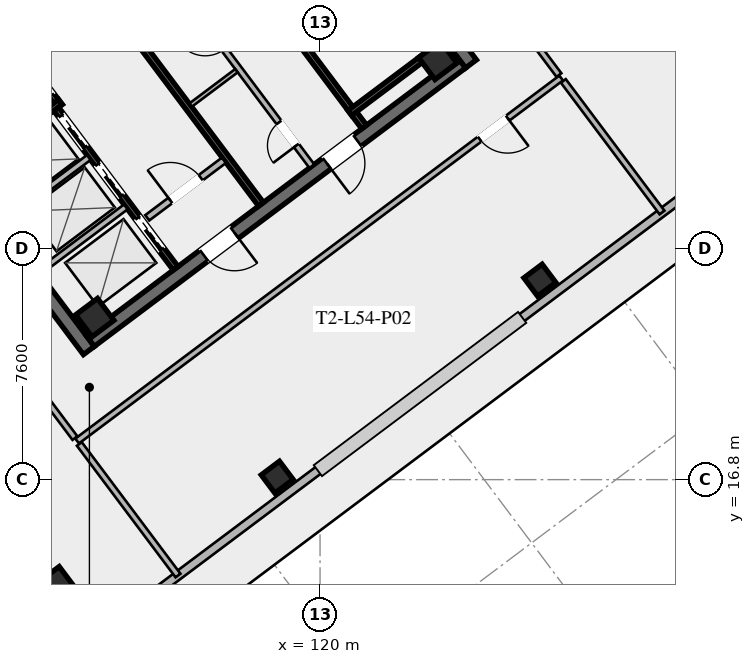
"""IFC4 building model, lengths in metres.
Left out: names, types, materials, properties, quantities, classifications, styles, units other than length and angle.
Written with IfcOpenShell. Run it as: python <this file> out.ifc"""

import sys

from ifc_helpers import new_model, si_unit, direction, frame, frame_2d, origin, origin_2d, place, context, subcontext, project, spatial, rectangle, hollow_rectangle, extrude, element, fill, save


model = new_model("IFC4")
c1 = context("Model", 3, precision=1e-05, world=origin(), true_north=direction((0.0, 1.0)))
c2 = subcontext(c1, "Body", "Model", "MODEL_VIEW")
j1 = project(units=[si_unit("LENGTHUNIT", "METRE"), si_unit("PLANEANGLEUNIT", "RADIAN")], contexts=[c1])
p1 = place(None, origin())
s1 = spatial("IfcSite", under=j1, at=p1, CompositionType="ELEMENT")
p2 = place(p1, origin())
s2 = spatial("IfcBuilding", under=s1, at=p2, CompositionType="ELEMENT")
p3 = place(p2, frame((0.0, 0.0, 199.6)))
s3 = spatial("IfcBuildingStorey", under=s2, at=p3, CompositionType="ELEMENT", Elevation=199.6)
for number, where, z_axis, x_axis in (
    (1, (112.396, 21.047, 0.0), (0.0, 0.0, 1.0), (-0.6, 0.8, 0.0)),
    (2, (115.604, 42.953, 0.0), (0.0, 0.0, 1.0), (0.6, -0.8, 0.0)),
):
    element("IfcWall", number, at=place(p3, frame(where, z_axis=z_axis, x_axis=x_axis)), inside=s3, PredefinedType="SHEAR", context=c2, shape_type="SweptSolid", body=[
        extrude(rectangle(XDim=15.6, YDim=0.45, at=frame_2d((7.8, 0.0))), origin(), (0.0, 0.0, 1.0), 4.6),
    ])
p4 = place(p3, frame((124.649, 30.518, 0.0), z_axis=(0.0, 0.0, 1.0), x_axis=(-0.8, -0.6, 0.0)))
e3 = element("IfcWall", 3, at=p4, inside=s3, PredefinedType="SHEAR", context=c2, shape_type="SweptSolid", body=[
    extrude(rectangle(XDim=15.26, YDim=0.45, at=frame_2d((7.63, 0.0))), origin(), (0.0, 0.0, 1.0), 4.6),
])
p5 = place(p4, frame((9.33, 0.0, 0.0)))
e4 = element("IfcOpeningElement", 4, at=p5, cuts=e3, PredefinedType="OPENING", context=c2, shape_type="SweptSolid", body=[
    extrude(rectangle(XDim=1.25, YDim=2.25, at=frame_2d((0.625, 1.125))), frame((0.0, 0.235, 0.0), z_axis=(0.0, -1.0, 0.0), x_axis=(1.0, 0.0, 0.0)), (0.0, 0.0, 1.0), 0.47),
])
p6 = place(p4, frame((4.28, 0.0, 0.0)))
e5 = element("IfcOpeningElement", 5, at=p6, cuts=e3, PredefinedType="OPENING", context=c2, shape_type="SweptSolid", body=[
    extrude(rectangle(XDim=1.25, YDim=2.25, at=frame_2d((0.625, 1.125))), frame((0.0, 0.235, 0.0), z_axis=(0.0, -1.0, 0.0), x_axis=(1.0, 0.0, 0.0)), (0.0, 0.0, 1.0), 0.47),
])
for number, where, z_axis, x_axis in (
    (6, (112.59, 22.13, 0.0), (0.0, 0.0, 1.0), (0.8, 0.6, 0.0)),
    (7, (123.87, 30.59, 0.0), (0.0, 0.0, 1.0), (0.8, 0.6, 0.0)),
):
    element("IfcColumn", number, at=place(p3, frame(where, z_axis=z_axis, x_axis=x_axis)), inside=s3, PredefinedType="COLUMN", context=c2, shape_type="SweptSolid", body=[
        extrude(hollow_rectangle(XDim=0.9, YDim=0.9, WallThickness=0.04, at=origin_2d()), origin(), (0.0, 0.0, 1.0), 4.42),
    ])
p7 = place(p3, frame((111.32, 13.24, -0.295), z_axis=(0.0, 0.0, 1.0), x_axis=(0.799999996291, 0.600000004945, 0.0)))
e8 = element("IfcColumn", 8, at=p7, inside=s3, PredefinedType="COLUMN", context=c2, shape_type="SweptSolid", body=[
    extrude(hollow_rectangle(XDim=1.0, YDim=1.0, WallThickness=0.04, at=origin_2d()), origin(), (0.0, 0.0, 1.0), 4.715),
])
for number, where, z_axis, x_axis in (
    (9, (118.59, 16.88, -0.295), (0.0, 0.0, 1.0), (0.8, 0.6, 0.0)),
    (10, (127.23, 23.36, -0.295), (0.0, 0.0, 1.0), (0.8, 0.6, 0.0)),
):
    element("IfcColumn", number, at=place(p3, frame(where, z_axis=z_axis, x_axis=x_axis)), inside=s3, PredefinedType="COLUMN", context=c2, shape_type="SweptSolid", body=[
        extrude(hollow_rectangle(XDim=0.75, YDim=0.75, WallThickness=0.032, at=origin_2d()), origin(), (0.0, 0.0, 1.0), 4.715),
    ])
for number, where, z_axis, x_axis in (
    (11, (134.072, 27.704, 0.0), (0.0, 0.0, 1.0), (-0.8, -0.6, 0.0)),
    (12, (118.296, 52.072, 0.0), (0.0, 0.0, 1.0), (0.6, -0.8, 0.0)),
):
    element("IfcWall", number, at=place(p3, frame(where, z_axis=z_axis, x_axis=x_axis)), inside=s3, PredefinedType="SOLIDWALL", context=c2, shape_type="SweptSolid", body=[
        extrude(rectangle(XDim=26.96, YDim=0.28, at=frame_2d((13.48, 0.0))), origin(), (0.0, 0.0, 1.0), 4.42),
    ])
p8 = place(p3, frame((111.44, 29.08, 0.0), z_axis=(0.0, 0.0, 1.0), x_axis=(-0.59999041401, 0.800007189403, 0.0)))
e13 = element("IfcWall", 13, at=p8, inside=s3, PredefinedType="SHEAR", context=c2, shape_type="SweptSolid", body=[
    extrude(rectangle(XDim=8.15, YDim=0.2, at=frame_2d((4.075, 0.0))), origin(), (0.0, 0.0, 1.0), 4.42),
])
p9 = place(p8, frame((0.45, 0.0, 0.0)))
e14 = element("IfcOpeningElement", 14, at=p9, cuts=e13, PredefinedType="OPENING", context=c2, shape_type="SweptSolid", body=[
    extrude(rectangle(XDim=1.15, YDim=2.2, at=frame_2d((0.575, 1.1))), frame((0.0, 0.11, 0.0), z_axis=(0.0, -1.0, 0.0), x_axis=(1.0, 0.0, 0.0)), (0.0, 0.0, 1.0), 0.22),
])
p10 = place(p3, frame((108.316, 26.862, 0.0), z_axis=(0.0, 0.0, 1.0), x_axis=(0.800014909178, 0.599980120581, 0.0)))
e15 = element("IfcWall", 15, at=p10, inside=s3, PredefinedType="SHEAR", context=c2, shape_type="SweptSolid", body=[
    extrude(rectangle(XDim=3.93, YDim=0.2, at=frame_2d((1.965, 0.0))), origin(), (0.0, 0.0, 1.0), 4.42),
])
p11 = place(p3, frame((116.56, 34.92, 0.0), z_axis=(0.0, 0.0, 1.0), x_axis=(0.59999041401, -0.800007189403, 0.0)))
e16 = element("IfcWall", 16, at=p11, inside=s3, PredefinedType="SHEAR", context=c2, shape_type="SweptSolid", body=[
    extrude(rectangle(XDim=8.15, YDim=0.2, at=frame_2d((4.075, 0.0))), origin(), (0.0, 0.0, 1.0), 4.42),
])
p12 = place(p11, frame((0.45, 0.0, 0.0)))
e17 = element("IfcOpeningElement", 17, at=p12, cuts=e16, PredefinedType="OPENING", context=c2, shape_type="SweptSolid", body=[
    extrude(rectangle(XDim=1.15, YDim=2.2, at=frame_2d((0.575, 1.1))), frame((0.0, 0.11, 0.0), z_axis=(0.0, -1.0, 0.0), x_axis=(1.0, 0.0, 0.0)), (0.0, 0.0, 1.0), 0.22),
])
p13 = place(p3, frame((120.98, 28.86, 0.0), z_axis=(0.0, 0.0, 1.0), x_axis=(0.800014909178, 0.599980120581, 0.0)))
e18 = element("IfcWall", 18, at=p13, inside=s3, PredefinedType="SHEAR", context=c2, shape_type="SweptSolid", body=[
    extrude(rectangle(XDim=3.93, YDim=0.2, at=frame_2d((1.965, 0.0))), origin(), (0.0, 0.0, 1.0), 4.42),
])
p14 = place(p3, frame((118.058, 25.856, 0.0), z_axis=(0.0, 0.0, 1.0), x_axis=(-0.600002657301, 0.799998007018, 0.0)))
e19 = element("IfcWall", 19, at=p14, inside=s3, PredefinedType="SHEAR", context=c2, shape_type="SweptSolid", body=[
    extrude(rectangle(XDim=14.7, YDim=0.2, at=frame_2d((7.35, 0.0))), origin(), (0.0, 0.0, 1.0), 4.42),
])
p15 = place(p3, frame((114.316, 25.412, 0.0), z_axis=(0.0, 0.0, 1.0), x_axis=(0.800018601094, 0.59997519774, 0.0)))
e20 = element("IfcWall", 20, at=p15, inside=s3, PredefinedType="SOLIDWALL", context=c2, shape_type="SweptSolid", body=[
    extrude(rectangle(XDim=3.15, YDim=0.22, at=frame_2d((1.575, 0.0))), origin(), (0.0, 0.0, 1.0), 3.531),
])
p16 = place(p15, frame((0.95, 0.0, 0.0)))
e21 = element("IfcOpeningElement", 21, at=p16, cuts=e20, PredefinedType="OPENING", context=c2, shape_type="SweptSolid", body=[
    extrude(rectangle(XDim=1.25, YDim=2.25, at=frame_2d((0.625, 1.125))), frame((0.0, 0.12, 0.0), z_axis=(0.0, -1.0, 0.0), x_axis=(1.0, 0.0, 0.0)), (0.0, 0.0, 1.0), 0.24),
])
p17 = place(p3, frame((115.25, 23.75, 0.0), z_axis=(0.0, 0.0, 1.0), x_axis=(-0.599994036198, 0.800004472816, 0.0)))
e22 = element("IfcWall", 22, at=p17, inside=s3, PredefinedType="SHEAR", context=c2, shape_type="SweptSolid", body=[
    extrude(rectangle(XDim=6.55, YDim=0.2, at=frame_2d((3.275, 0.0))), origin(), (0.0, 0.0, 1.0), 4.42),
])
p18 = place(p17, frame((4.975, 0.0, 0.0)))
e23 = element("IfcOpeningElement", 23, at=p18, cuts=e22, PredefinedType="OPENING", context=c2, shape_type="SweptSolid", body=[
    extrude(rectangle(XDim=1.3, YDim=2.25, at=frame_2d((0.65, 1.125))), frame((0.0, 0.11, 0.0), z_axis=(0.0, -1.0, 0.0), x_axis=(1.0, 0.0, 0.0)), (0.0, 0.0, 1.0), 0.22),
])
p19 = place(p17, frame((2.975, 0.0, 0.0)))
e24 = element("IfcOpeningElement", 24, at=p19, cuts=e22, PredefinedType="OPENING", context=c2, shape_type="SweptSolid", body=[
    extrude(rectangle(XDim=1.3, YDim=2.25, at=frame_2d((0.65, 1.125))), frame((0.0, 0.11, 0.0), z_axis=(0.0, -1.0, 0.0), x_axis=(1.0, 0.0, 0.0)), (0.0, 0.0, 1.0), 0.22),
])
p20 = place(p17, frame((0.775, 0.0, 0.0)))
e25 = element("IfcOpeningElement", 25, at=p20, cuts=e22, PredefinedType="OPENING", context=c2, shape_type="SweptSolid", body=[
    extrude(rectangle(XDim=1.3, YDim=2.25, at=frame_2d((0.65, 1.125))), frame((0.0, 0.11, 0.0), z_axis=(0.0, -1.0, 0.0), x_axis=(1.0, 0.0, 0.0)), (0.0, 0.0, 1.0), 0.22),
])
for number, where, z_axis, x_axis in (
    (26, (110.746, 23.622, 0.0), (0.0, 0.0, 1.0), (0.8, 0.6, 0.0)),
    (27, (109.528, 25.246, 0.0), (0.0, 0.0, 1.0), (0.8, 0.6, 0.0)),
):
    element("IfcWall", number, at=place(p3, frame(where, z_axis=z_axis, x_axis=x_axis)), inside=s3, PredefinedType="SOLIDWALL", context=c2, shape_type="SweptSolid", body=[
        extrude(rectangle(XDim=3.58, YDim=0.2, at=frame_2d((1.79, 0.0))), origin(), (0.0, 0.0, 1.0), 4.42),
    ])
p21 = place(p3, frame((119.73, 27.11, 0.0), z_axis=(0.0, 0.0, 1.0), x_axis=(-0.600005580459, 0.799995814625, 0.0)))
e28 = element("IfcWall", 28, at=p21, inside=s3, PredefinedType="SOLIDWALL", context=c2, shape_type="SweptSolid", body=[
    extrude(rectangle(XDim=7.0, YDim=0.2, at=frame_2d((3.5, 0.0))), origin(), (0.0, 0.0, 1.0), 3.531),
])
p22 = place(p21, frame((0.85, 0.0, 0.0)))
e29 = element("IfcOpeningElement", 29, at=p22, cuts=e28, PredefinedType="OPENING", context=c2, shape_type="SweptSolid", body=[
    extrude(rectangle(XDim=0.95, YDim=2.05, at=frame_2d((0.475, 1.025))), frame((0.0, 0.11, 0.0), z_axis=(0.0, -1.0, 0.0), x_axis=(1.0, 0.0, 0.0)), (0.0, 0.0, 1.0), 0.22),
])
p23 = place(p21, frame((4.8, 0.0, 0.0)))
e30 = element("IfcOpeningElement", 30, at=p23, cuts=e28, PredefinedType="OPENING", context=c2, shape_type="SweptSolid", body=[
    extrude(rectangle(XDim=1.05, YDim=2.2, at=frame_2d((0.525, 1.1))), frame((0.0, 0.11, 0.0), z_axis=(0.0, -1.0, 0.0), x_axis=(1.0, 0.0, 0.0)), (0.0, 0.0, 1.0), 0.22),
])
p24 = place(p3, frame((115.746, 29.122, 0.0), z_axis=(0.0, 0.0, 1.0), x_axis=(0.8, 0.6, 0.0)))
e31 = element("IfcWall", 31, at=p24, inside=s3, PredefinedType="PARTITIONING", context=c2, shape_type="SweptSolid", body=[
    extrude(rectangle(XDim=1.88, YDim=0.135, at=frame_2d((0.94, 0.0))), origin(), (0.0, 0.0, 1.0), 3.531),
])
p25 = place(p3, frame((127.93, 30.01, 0.0), z_axis=(0.0, 0.0, 1.0), x_axis=(-0.8, -0.6, 0.0)))
e32 = element("IfcWall", 32, at=p25, inside=s3, PredefinedType="SOLIDWALL", context=c2, shape_type="SweptSolid", body=[
    extrude(rectangle(XDim=19.9, YDim=0.2, at=frame_2d((9.95, 0.0))), origin(), (0.0, 0.0, 1.0), 3.531),
])
p26 = place(p25, frame((2.2, 0.0, 0.0)))
e33 = element("IfcOpeningElement", 33, at=p26, cuts=e32, PredefinedType="OPENING", context=c2, shape_type="SweptSolid", body=[
    extrude(rectangle(XDim=1.15, YDim=2.2, at=frame_2d((0.575, 1.1))), frame((0.0, 0.11, 0.0), z_axis=(0.0, -1.0, 0.0), x_axis=(1.0, 0.0, 0.0)), (0.0, 0.0, 1.0), 0.22),
])
p27 = place(p3, frame((124.0, 35.25, 0.0), z_axis=(0.0, 0.0, 1.0), x_axis=(0.599987849816, -0.800009112494, 0.0)))
e34 = element("IfcWall", 34, at=p27, inside=s3, PredefinedType="SOLIDWALL", context=c2, shape_type="SweptSolid", body=[
    extrude(rectangle(XDim=6.43, YDim=0.2, at=frame_2d((3.215, 0.0))), origin(), (0.0, 0.0, 1.0), 3.531),
])
p28 = place(p27, frame((3.0, 0.0, 0.0)))
e35 = element("IfcOpeningElement", 35, at=p28, cuts=e34, PredefinedType="OPENING", context=c2, shape_type="SweptSolid", body=[
    extrude(rectangle(XDim=1.15, YDim=2.2, at=frame_2d((0.575, 1.1))), frame((0.0, 0.11, 0.0), z_axis=(0.0, -1.0, 0.0), x_axis=(1.0, 0.0, 0.0)), (0.0, 0.0, 1.0), 0.22),
])
p29 = place(p3, frame((111.938, 18.166, 0.0), z_axis=(0.0, 0.0, 1.0), x_axis=(-0.59999602618, 0.80000298035, 0.0)))
e36 = element("IfcWall", 36, at=p29, inside=s3, PredefinedType="SOLIDWALL", context=c2, shape_type="SweptSolid", body=[
    extrude(rectangle(XDim=19.66, YDim=0.2, at=frame_2d((9.83, 0.0))), origin(), (0.0, 0.0, 1.0), 3.531),
])
p30 = place(p29, frame((3.0, 0.0, 0.0)))
e37 = element("IfcOpeningElement", 37, at=p30, cuts=e36, PredefinedType="OPENING", context=c2, shape_type="SweptSolid", body=[
    extrude(rectangle(XDim=1.25, YDim=2.25, at=frame_2d((0.625, 1.125))), frame((0.0, 0.11, 0.0), z_axis=(0.0, -1.0, 0.0), x_axis=(1.0, 0.0, 0.0)), (0.0, 0.0, 1.0), 0.22),
])
p31 = place(p29, frame((13.2, 0.0, 0.0)))
e38 = element("IfcOpeningElement", 38, at=p31, cuts=e36, PredefinedType="OPENING", context=c2, shape_type="SweptSolid", body=[
    extrude(rectangle(XDim=1.15, YDim=2.2, at=frame_2d((0.575, 1.1))), frame((0.0, 0.11, 0.0), z_axis=(0.0, -1.0, 0.0), x_axis=(1.0, 0.0, 0.0)), (0.0, 0.0, 1.0), 0.22),
])
p32 = place(p3, frame((112.082, 17.974, 0.0), z_axis=(0.0, 0.0, 1.0), x_axis=(0.599971117961, -0.800021660715, 0.0)))
e39 = element("IfcWall", 39, at=p32, inside=s3, PredefinedType="SOLIDWALL", context=c2, shape_type="SweptSolid", body=[
    extrude(rectangle(XDim=5.41, YDim=0.2, at=frame_2d((2.705, 0.0))), origin(), (0.0, 0.0, 1.0), 3.531),
])
p33 = place(p3, frame((128.002, 29.914, 0.0), z_axis=(0.0, 0.0, 1.0), x_axis=(0.6, -0.8, 0.0)))
e40 = element("IfcWall", 40, at=p33, inside=s3, PredefinedType="SOLIDWALL", context=c2, shape_type="SweptSolid", body=[
    extrude(rectangle(XDim=5.41, YDim=0.2, at=frame_2d((2.705, 0.0))), origin(), (0.0, 0.0, 1.0), 3.531),
])
p34 = place(p5, origin())
e41 = element("IfcDoor", 41, at=p34, inside=s3, OperationType="SINGLE_SWING_LEFT", PredefinedType="DOOR", context=c2, shape_type="SweptSolid", body=[
    extrude(rectangle(XDim=1.25, YDim=2.25, at=frame_2d((0.625, 1.125))), frame((0.0, 0.025, 0.0), z_axis=(0.0, -1.0, 0.0), x_axis=(1.0, 0.0, 0.0)), (0.0, 0.0, 1.0), 0.05),
])
fill(e4, e41)
p35 = place(p6, origin())
e42 = element("IfcDoor", 42, at=p35, inside=s3, OperationType="SINGLE_SWING_RIGHT", PredefinedType="DOOR", context=c2, shape_type="SweptSolid", body=[
    extrude(rectangle(XDim=1.25, YDim=2.25, at=frame_2d((0.625, 1.125))), frame((0.0, 0.025, 0.0), z_axis=(0.0, -1.0, 0.0), x_axis=(1.0, 0.0, 0.0)), (0.0, 0.0, 1.0), 0.05),
])
fill(e5, e42)
p36 = place(p9, origin())
e43 = element("IfcDoor", 43, at=p36, inside=s3, OperationType="SINGLE_SWING_RIGHT", PredefinedType="DOOR", context=c2, shape_type="SweptSolid", body=[
    extrude(rectangle(XDim=1.15, YDim=2.2, at=frame_2d((0.575, 1.1))), frame((0.0, 0.025, 0.0), z_axis=(0.0, -1.0, 0.0), x_axis=(1.0, 0.0, 0.0)), (0.0, 0.0, 1.0), 0.05),
])
fill(e14, e43)
p37 = place(p16, origin())
e44 = element("IfcDoor", 44, at=p37, inside=s3, OperationType="SINGLE_SWING_LEFT", PredefinedType="DOOR", context=c2, shape_type="SweptSolid", body=[
    extrude(rectangle(XDim=1.25, YDim=2.25, at=frame_2d((0.625, 1.125))), frame((0.0, 0.025, 0.0), z_axis=(0.0, -1.0, 0.0), x_axis=(1.0, 0.0, 0.0)), (0.0, 0.0, 1.0), 0.05),
])
fill(e21, e44)
p38 = place(p22, origin())
e45 = element("IfcDoor", 45, at=p38, inside=s3, OperationType="SINGLE_SWING_LEFT", PredefinedType="DOOR", context=c2, shape_type="SweptSolid", body=[
    extrude(rectangle(XDim=0.95, YDim=2.05, at=frame_2d((0.475, 1.025))), frame((0.0, 0.025, 0.0), z_axis=(0.0, -1.0, 0.0), x_axis=(1.0, 0.0, 0.0)), (0.0, 0.0, 1.0), 0.05),
])
fill(e29, e45)
p39 = place(p26, origin())
e46 = element("IfcDoor", 46, at=p39, inside=s3, OperationType="SINGLE_SWING_LEFT", PredefinedType="DOOR", context=c2, shape_type="SweptSolid", body=[
    extrude(rectangle(XDim=1.15, YDim=2.2, at=frame_2d((0.575, 1.1))), frame((0.0, 0.025, 0.0), z_axis=(0.0, -1.0, 0.0), x_axis=(1.0, 0.0, 0.0)), (0.0, 0.0, 1.0), 0.05),
])
fill(e33, e46)
p40 = place(p18, origin())
e47 = element("IfcDoor", 47, at=p40, inside=s3, OperationType="SLIDING_TO_LEFT", PredefinedType="DOOR", context=c2, shape_type="SweptSolid", body=[
    extrude(rectangle(XDim=1.3, YDim=2.25, at=frame_2d((0.65, 1.125))), frame((0.0, 0.025, 0.0), z_axis=(0.0, -1.0, 0.0), x_axis=(1.0, 0.0, 0.0)), (0.0, 0.0, 1.0), 0.05),
])
fill(e23, e47)
p41 = place(p19, origin())
e48 = element("IfcDoor", 48, at=p41, inside=s3, OperationType="SLIDING_TO_LEFT", PredefinedType="DOOR", context=c2, shape_type="SweptSolid", body=[
    extrude(rectangle(XDim=1.3, YDim=2.25, at=frame_2d((0.65, 1.125))), frame((0.0, 0.025, 0.0), z_axis=(0.0, -1.0, 0.0), x_axis=(1.0, 0.0, 0.0)), (0.0, 0.0, 1.0), 0.05),
])
fill(e24, e48)
p42 = place(p20, origin())
e49 = element("IfcDoor", 49, at=p42, inside=s3, OperationType="SLIDING_TO_LEFT", PredefinedType="DOOR", context=c2, shape_type="SweptSolid", body=[
    extrude(rectangle(XDim=1.3, YDim=2.25, at=frame_2d((0.65, 1.125))), frame((0.0, 0.025, 0.0), z_axis=(0.0, -1.0, 0.0), x_axis=(1.0, 0.0, 0.0)), (0.0, 0.0, 1.0), 0.05),
])
fill(e25, e49)
save(model, sys.argv[1])
